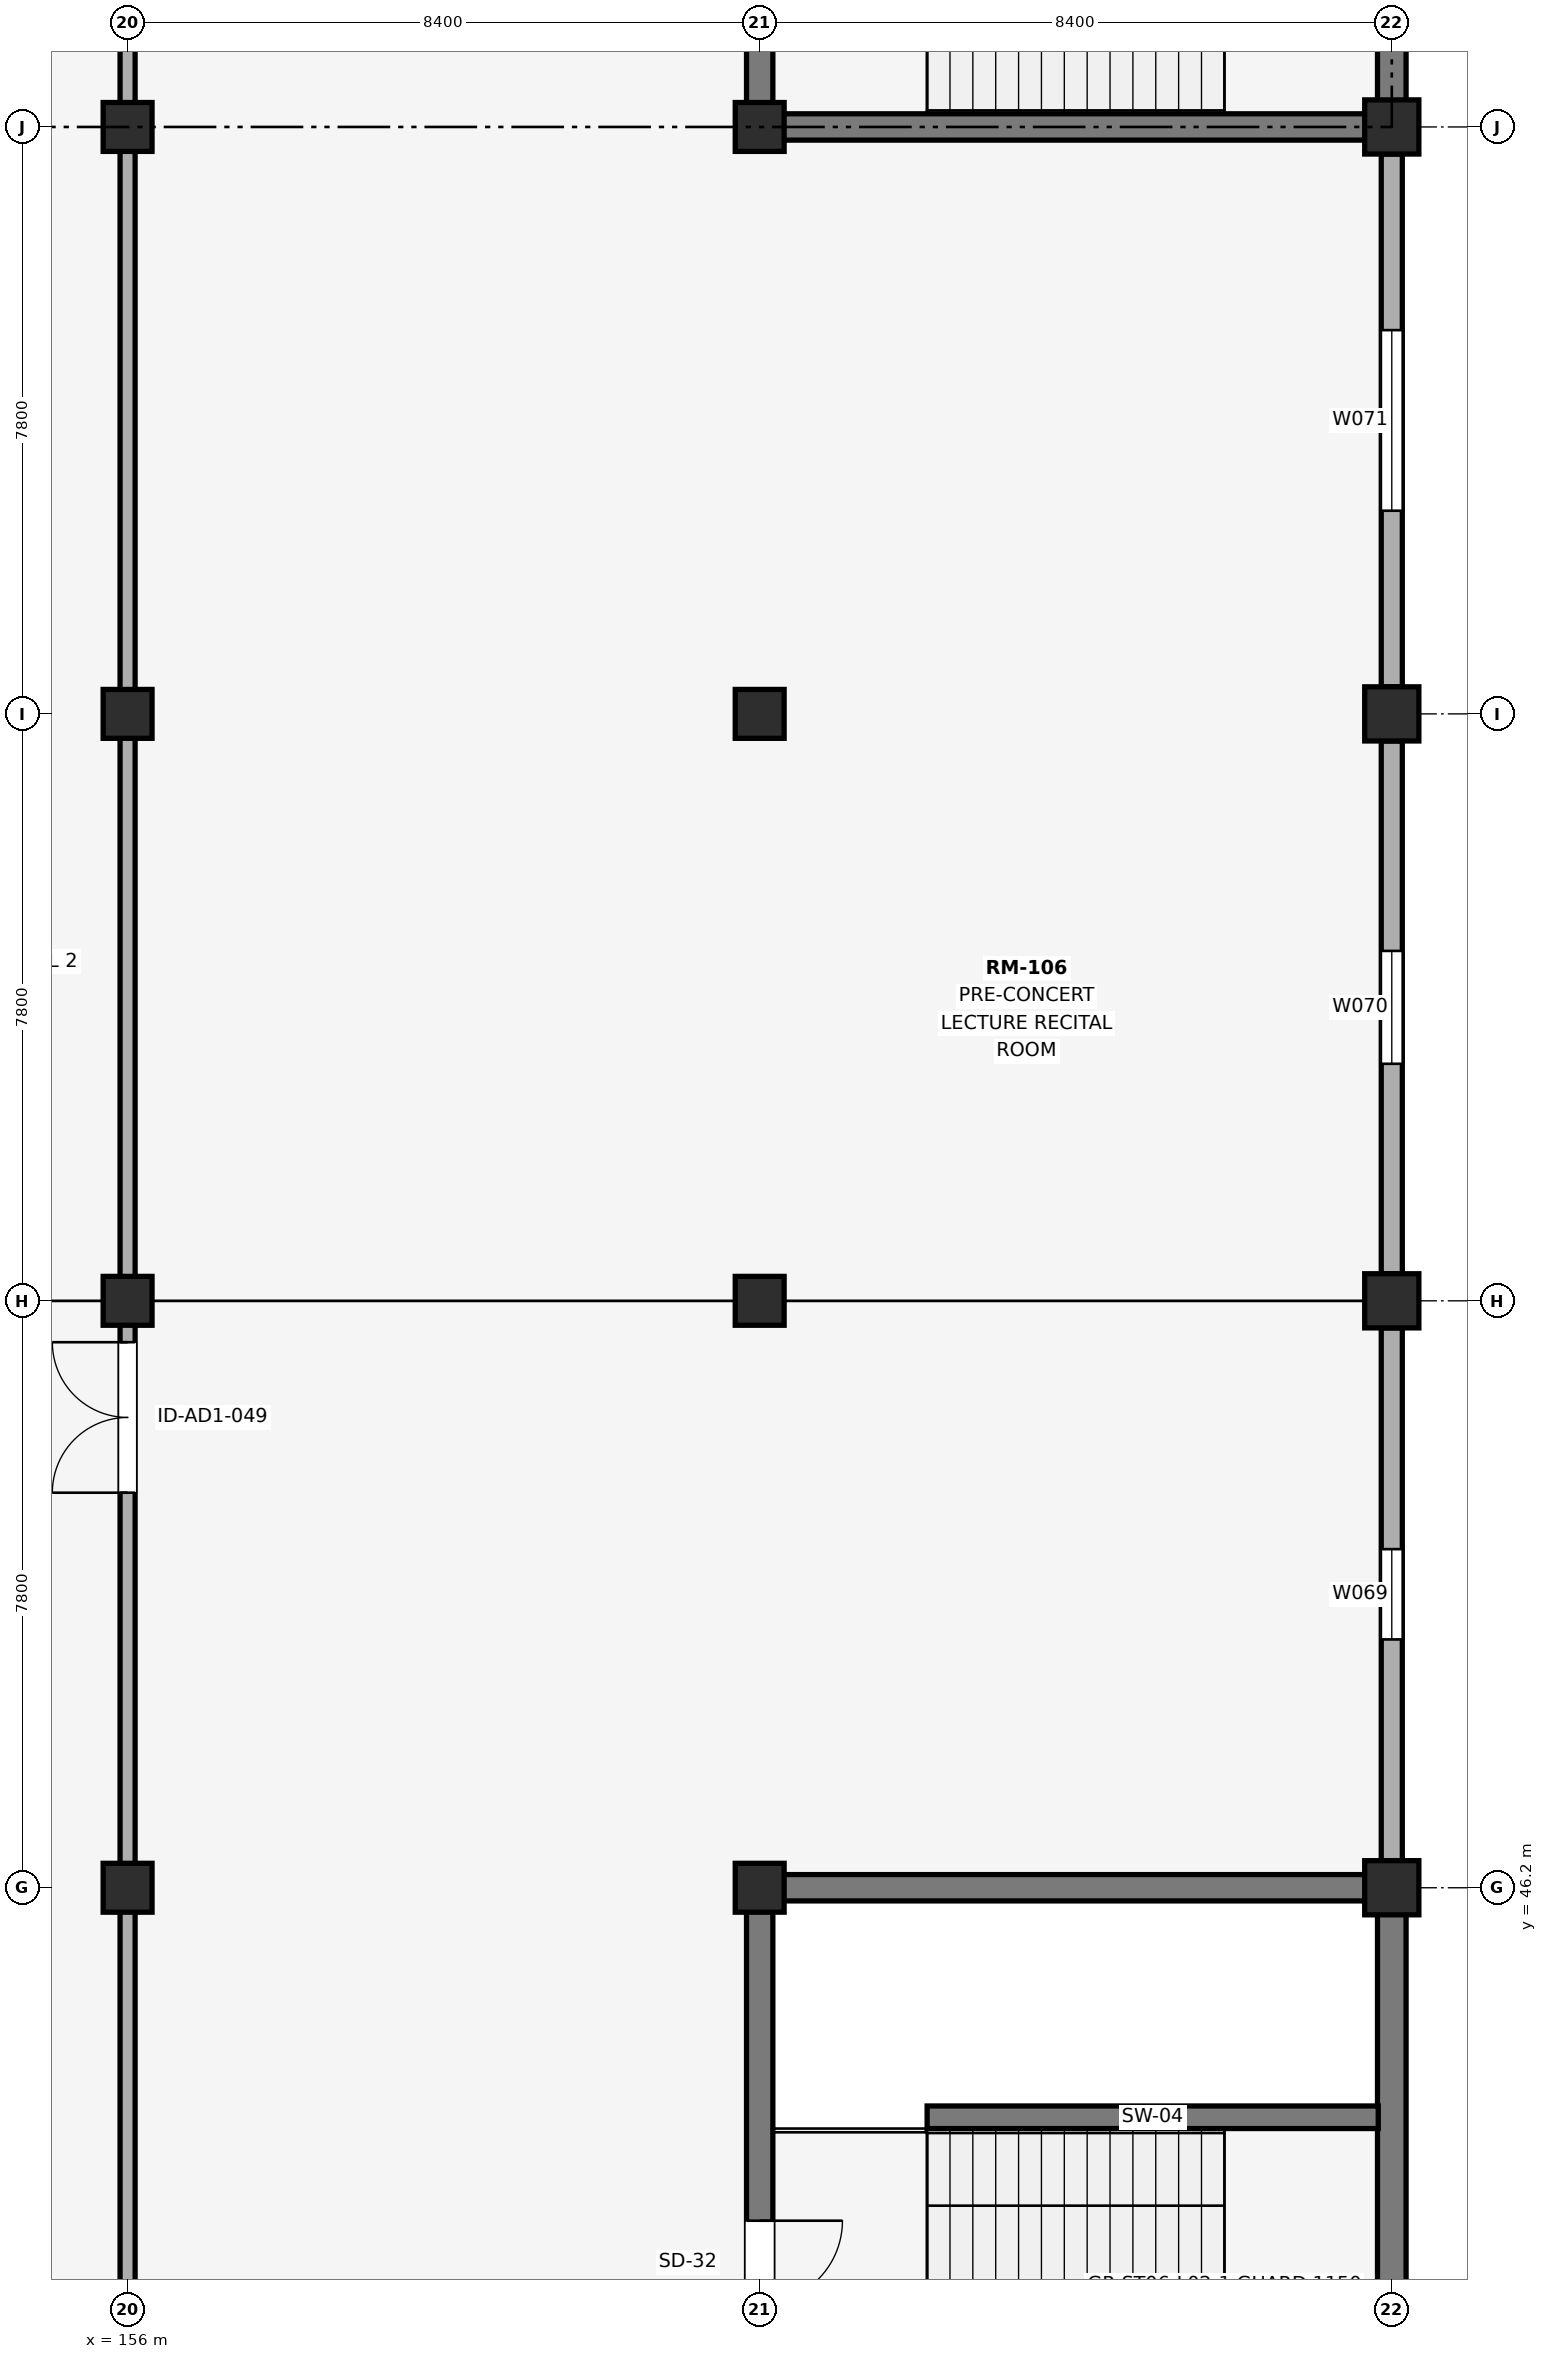
"""IFC4 building model, lengths in metres.
Left out: names, types, materials, properties, quantities, classifications, styles, units other than length and angle.
Written with IfcOpenShell. Run it as: python <this file> out.ifc"""

import sys

from ifc_helpers import new_model, si_unit, direction, frame, frame_2d, origin, origin_2d, place, context, subcontext, project, spatial, rectangle, extrude, element, fill, save


model = new_model("IFC4")
c1 = context("Model", 3, precision=1e-05, world=origin(), true_north=direction((0.0, 1.0)))
c2 = subcontext(c1, "Body", "Model", "MODEL_VIEW")
j1 = project(units=[si_unit("LENGTHUNIT", "METRE"), si_unit("PLANEANGLEUNIT", "RADIAN")], contexts=[c1])
p1 = place(None, origin())
s1 = spatial("IfcSite", under=j1, at=p1, CompositionType="ELEMENT")
p2 = place(p1, origin())
s2 = spatial("IfcBuilding", under=s1, at=p2, CompositionType="ELEMENT")
p3 = place(p2, frame((0.0, 0.0, 10.2)))
s3 = spatial("IfcBuildingStorey", under=s2, at=p3, CompositionType="ELEMENT", Elevation=10.2)
for number, where, z_axis, x_axis in (
    (1, (156.0, 46.2, 0.0), (0.0, 0.0, 1.0), (1.0, 0.0, 0.0)),
    (2, (156.0, 54.0, 0.0), (0.0, 0.0, 1.0), (1.0, 0.0, 0.0)),
    (3, (156.0, 61.8, 0.0), (0.0, 0.0, 1.0), (1.0, 0.0, 0.0)),
    (4, (156.0, 69.6, 0.0), (0.0, 0.0, 1.0), (1.0, 0.0, 0.0)),
    (5, (164.4, 46.2, 0.0), (0.0, 0.0, 1.0), (1.0, 0.0, 0.0)),
    (6, (164.4, 54.0, 0.0), (0.0, 0.0, 1.0), (1.0, 0.0, 0.0)),
    (7, (164.4, 61.8, 0.0), (0.0, 0.0, 1.0), (1.0, 0.0, 0.0)),
    (8, (164.4, 69.6, 0.0), (0.0, 0.0, 1.0), (1.0, 0.0, 0.0)),
):
    element("IfcColumn", number, at=place(p3, frame(where, z_axis=z_axis, x_axis=x_axis)), inside=s3, PredefinedType="COLUMN", context=c2, shape_type="SweptSolid", body=[
        extrude(rectangle(XDim=0.65, YDim=0.65, at=origin_2d()), origin(), (0.0, 0.0, 1.0), 4.8),
    ])
for number, where, z_axis, x_axis in (
    (9, (172.8, 46.2, 0.0), (0.0, 0.0, 1.0), (1.0, 0.0, 0.0)),
    (10, (172.8, 54.0, 0.0), (0.0, 0.0, 1.0), (1.0, 0.0, 0.0)),
    (11, (172.8, 61.8, 0.0), (0.0, 0.0, 1.0), (1.0, 0.0, 0.0)),
    (12, (172.8, 69.6, 0.0), (0.0, 0.0, 1.0), (1.0, 0.0, 0.0)),
):
    element("IfcColumn", number, at=place(p3, frame(where, z_axis=z_axis, x_axis=x_axis)), inside=s3, PredefinedType="COLUMN", context=c2, shape_type="SweptSolid", body=[
        extrude(rectangle(XDim=0.72, YDim=0.72, at=origin_2d()), origin(), (0.0, 0.0, 1.0), 4.8),
    ])
p4 = place(p3, frame((164.225, 69.6, 0.0), z_axis=(0.0, 0.0, 1.0), x_axis=(1.0, 0.0, 0.0)))
e13 = element("IfcWall", 13, at=p4, inside=s3, PredefinedType="SHEAR", context=c2, shape_type="SweptSolid", body=[
    extrude(rectangle(XDim=8.75, YDim=0.35, at=frame_2d((4.375, 0.0))), origin(), (0.0, 0.0, 1.0), 4.8),
])
p5 = place(p3, frame((164.4, 69.775, 0.0), z_axis=(0.0, 0.0, 1.0), x_axis=(0.0, 1.0, 0.0)))
e14 = element("IfcWall", 14, at=p5, inside=s3, PredefinedType="SHEAR", context=c2, shape_type="SweptSolid", body=[
    extrude(rectangle(XDim=7.45, YDim=0.35, at=frame_2d((3.725, 0.0))), origin(), (0.0, 0.0, 1.0), 4.8),
])
p6 = place(p5, frame((2.1, 0.0, 0.0)))
e15 = element("IfcOpeningElement", 15, at=p6, cuts=e14, PredefinedType="OPENING", context=c2, shape_type="SweptSolid", body=[
    extrude(rectangle(XDim=1.1, YDim=2.2, at=frame_2d((0.55, 1.1))), frame((0.0, 0.185, 0.0), z_axis=(0.0, -1.0, 0.0), x_axis=(1.0, 0.0, 0.0)), (0.0, 0.0, 1.0), 0.37),
])
p7 = place(p3, frame((172.8, 69.775, 0.0), z_axis=(0.0, 0.0, 1.0), x_axis=(0.0, 1.0, 0.0)))
e16 = element("IfcWall", 16, at=p7, inside=s3, PredefinedType="SHEAR", context=c2, shape_type="SweptSolid", body=[
    extrude(rectangle(XDim=7.45, YDim=0.38, at=frame_2d((3.725, 0.0))), origin(), (0.0, 0.0, 1.0), 4.8),
])
p8 = place(p3, frame((164.225, 46.2, 0.0), z_axis=(0.0, 0.0, 1.0), x_axis=(1.0, 0.0, 0.0)))
e17 = element("IfcWall", 17, at=p8, inside=s3, PredefinedType="SHEAR", context=c2, shape_type="SweptSolid", body=[
    extrude(rectangle(XDim=8.75, YDim=0.35, at=frame_2d((4.375, 0.0))), origin(), (0.0, 0.0, 1.0), 4.8),
])
p9 = place(p3, frame((164.4, 38.575, 0.0), z_axis=(0.0, 0.0, 1.0), x_axis=(0.0, 1.0, 0.0)))
e18 = element("IfcWall", 18, at=p9, inside=s3, PredefinedType="SHEAR", context=c2, shape_type="SweptSolid", body=[
    extrude(rectangle(XDim=7.45, YDim=0.35, at=frame_2d((3.725, 0.0))), origin(), (0.0, 0.0, 1.0), 4.8),
])
p10 = place(p9, frame((2.1, 0.0, 0.0)))
e19 = element("IfcOpeningElement", 19, at=p10, cuts=e18, PredefinedType="OPENING", context=c2, shape_type="SweptSolid", body=[
    extrude(rectangle(XDim=1.1, YDim=2.2, at=frame_2d((0.55, 1.1))), frame((0.0, 0.185, 0.0), z_axis=(0.0, -1.0, 0.0), x_axis=(1.0, 0.0, 0.0)), (0.0, 0.0, 1.0), 0.37),
])
p11 = place(p3, frame((172.8, 38.575, 0.0), z_axis=(0.0, 0.0, 1.0), x_axis=(0.0, 1.0, 0.0)))
e20 = element("IfcWall", 20, at=p11, inside=s3, PredefinedType="SHEAR", context=c2, shape_type="SweptSolid", body=[
    extrude(rectangle(XDim=7.45, YDim=0.38, at=frame_2d((3.725, 0.0))), origin(), (0.0, 0.0, 1.0), 4.8),
])
p12 = place(p3, frame((166.625, 43.15, 0.0), z_axis=(0.0, 0.0, 1.0), x_axis=(1.0, 0.0, 0.0)))
e21 = element("IfcWall", 21, at=p12, inside=s3, PredefinedType="SHEAR", context=c2, shape_type="SweptSolid", body=[
    extrude(rectangle(XDim=5.995, YDim=0.3, at=frame_2d((2.998, 0.0))), origin(), (0.0, 0.0, 1.0), 4.8),
])
p13 = place(p3, frame((172.8, 46.56, 0.0), z_axis=(0.0, 0.0, 1.0), x_axis=(0.0, 1.0, 0.0)))
e22 = element("IfcWall", 22, at=p13, inside=s3, PredefinedType="SOLIDWALL", context=c2, shape_type="SweptSolid", body=[
    extrude(rectangle(XDim=7.08, YDim=0.28, at=frame_2d((3.54, 0.0))), origin(), (0.0, 0.0, 1.0), 3.82),
])
p14 = place(p13, frame((2.94, 0.0, 0.9)))
e23 = element("IfcOpeningElement", 23, at=p14, cuts=e22, PredefinedType="OPENING", context=c2, shape_type="SweptSolid", body=[
    extrude(rectangle(XDim=1.2, YDim=1.65, at=frame_2d((0.6, 0.825))), frame((0.0, 0.15, 0.0), z_axis=(0.0, -1.0, 0.0), x_axis=(1.0, 0.0, 0.0)), (0.0, 0.0, 1.0), 0.3),
])
p15 = place(p3, frame((172.8, 54.36, 0.0), z_axis=(0.0, 0.0, 1.0), x_axis=(0.0, 1.0, 0.0)))
e24 = element("IfcWall", 24, at=p15, inside=s3, PredefinedType="SOLIDWALL", context=c2, shape_type="SweptSolid", body=[
    extrude(rectangle(XDim=7.08, YDim=0.28, at=frame_2d((3.54, 0.0))), origin(), (0.0, 0.0, 1.0), 3.82),
])
p16 = place(p15, frame((2.79, 0.0, 0.9)))
e25 = element("IfcOpeningElement", 25, at=p16, cuts=e24, PredefinedType="OPENING", context=c2, shape_type="SweptSolid", body=[
    extrude(rectangle(XDim=1.5, YDim=2.1, at=frame_2d((0.75, 1.05))), frame((0.0, 0.15, 0.0), z_axis=(0.0, -1.0, 0.0), x_axis=(1.0, 0.0, 0.0)), (0.0, 0.0, 1.0), 0.3),
])
p17 = place(p3, frame((172.8, 62.16, 0.0), z_axis=(0.0, 0.0, 1.0), x_axis=(0.0, 1.0, 0.0)))
e26 = element("IfcWall", 26, at=p17, inside=s3, PredefinedType="SOLIDWALL", context=c2, shape_type="SweptSolid", body=[
    extrude(rectangle(XDim=7.08, YDim=0.28, at=frame_2d((3.54, 0.0))), origin(), (0.0, 0.0, 1.0), 3.82),
])
p18 = place(p17, frame((2.34, 0.0, 0.9)))
e27 = element("IfcOpeningElement", 27, at=p18, cuts=e26, PredefinedType="OPENING", context=c2, shape_type="SweptSolid", body=[
    extrude(rectangle(XDim=2.4, YDim=2.1, at=frame_2d((1.2, 1.05))), frame((0.0, 0.15, 0.0), z_axis=(0.0, -1.0, 0.0), x_axis=(1.0, 0.0, 0.0)), (0.0, 0.0, 1.0), 0.3),
])
p19 = place(p3, frame((156.0, 24.15, 0.0), z_axis=(0.0, 0.0, 1.0), x_axis=(0.0, 1.0, 0.0)))
e28 = element("IfcWall", 28, at=p19, inside=s3, PredefinedType="PARTITIONING", context=c2, shape_type="SweptSolid", body=[
    extrude(rectangle(XDim=69.12, YDim=0.2, at=frame_2d((34.56, 0.0))), origin(), (0.0, 0.0, 1.0), 3.72),
])
p20 = place(p19, frame((8.0, 0.0, 0.0)))
e29 = element("IfcOpeningElement", 29, at=p20, cuts=e28, PredefinedType="OPENING", context=c2, shape_type="SweptSolid", body=[
    extrude(rectangle(XDim=1.05, YDim=2.25, at=frame_2d((0.525, 1.125))), frame((0.0, 0.11, 0.0), z_axis=(0.0, -1.0, 0.0), x_axis=(1.0, 0.0, 0.0)), (0.0, 0.0, 1.0), 0.22),
])
p21 = place(p19, frame((27.3, 0.0, 0.0)))
e30 = element("IfcOpeningElement", 30, at=p21, cuts=e28, PredefinedType="OPENING", context=c2, shape_type="SweptSolid", body=[
    extrude(rectangle(XDim=2.0, YDim=2.45, at=frame_2d((1.0, 1.225))), frame((0.0, 0.11, 0.0), z_axis=(0.0, -1.0, 0.0), x_axis=(1.0, 0.0, 0.0)), (0.0, 0.0, 1.0), 0.22),
])
p22 = place(p19, frame((63.0, 0.0, 0.0)))
e31 = element("IfcOpeningElement", 31, at=p22, cuts=e28, PredefinedType="OPENING", context=c2, shape_type="SweptSolid", body=[
    extrude(rectangle(XDim=0.92, YDim=2.15, at=frame_2d((0.46, 1.075))), frame((0.0, 0.11, 0.0), z_axis=(0.0, -1.0, 0.0), x_axis=(1.0, 0.0, 0.0)), (0.0, 0.0, 1.0), 0.22),
])
p23 = place(p14, origin())
e32 = element("IfcWindow", 32, at=p23, inside=s3, PartitioningType="SINGLE_PANEL", PredefinedType="WINDOW", context=c2, shape_type="SweptSolid", body=[
    extrude(rectangle(XDim=1.2, YDim=1.65, at=frame_2d((0.6, 0.825))), frame((0.0, 0.03, 0.0), z_axis=(0.0, -1.0, 0.0), x_axis=(1.0, 0.0, 0.0)), (0.0, 0.0, 1.0), 0.06),
])
fill(e23, e32)
p24 = place(p16, origin())
e33 = element("IfcWindow", 33, at=p24, inside=s3, PartitioningType="SINGLE_PANEL", PredefinedType="WINDOW", context=c2, shape_type="SweptSolid", body=[
    extrude(rectangle(XDim=1.5, YDim=2.1, at=frame_2d((0.75, 1.05))), frame((0.0, 0.03, 0.0), z_axis=(0.0, -1.0, 0.0), x_axis=(1.0, 0.0, 0.0)), (0.0, 0.0, 1.0), 0.06),
])
fill(e25, e33)
p25 = place(p18, origin())
e34 = element("IfcWindow", 34, at=p25, inside=s3, PartitioningType="SINGLE_PANEL", PredefinedType="WINDOW", context=c2, shape_type="SweptSolid", body=[
    extrude(rectangle(XDim=2.4, YDim=2.1, at=frame_2d((1.2, 1.05))), frame((0.0, 0.03, 0.0), z_axis=(0.0, -1.0, 0.0), x_axis=(1.0, 0.0, 0.0)), (0.0, 0.0, 1.0), 0.06),
])
fill(e27, e34)
p26 = place(p10, frame((1.1, 0.0, 0.0), z_axis=(0.0, 0.0, 1.0), x_axis=(-1.0, 0.0, 0.0)))
e35 = element("IfcDoor", 35, at=p26, inside=s3, OperationType="SINGLE_SWING_RIGHT", PredefinedType="DOOR", context=c2, shape_type="SweptSolid", body=[
    extrude(rectangle(XDim=1.1, YDim=2.2, at=frame_2d((0.55, 1.1))), frame((0.0, 0.025, 0.0), z_axis=(0.0, -1.0, 0.0), x_axis=(1.0, 0.0, 0.0)), (0.0, 0.0, 1.0), 0.05),
])
fill(e19, e35)
p27 = place(p21, origin())
e36 = element("IfcDoor", 36, at=p27, inside=s3, OperationType="DOUBLE_DOOR_SINGLE_SWING", PredefinedType="DOOR", context=c2, shape_type="SweptSolid", body=[
    extrude(rectangle(XDim=2.0, YDim=2.45, at=frame_2d((1.0, 1.225))), frame((0.0, 0.025, 0.0), z_axis=(0.0, -1.0, 0.0), x_axis=(1.0, 0.0, 0.0)), (0.0, 0.0, 1.0), 0.05),
])
fill(e30, e36)
save(model, sys.argv[1])
